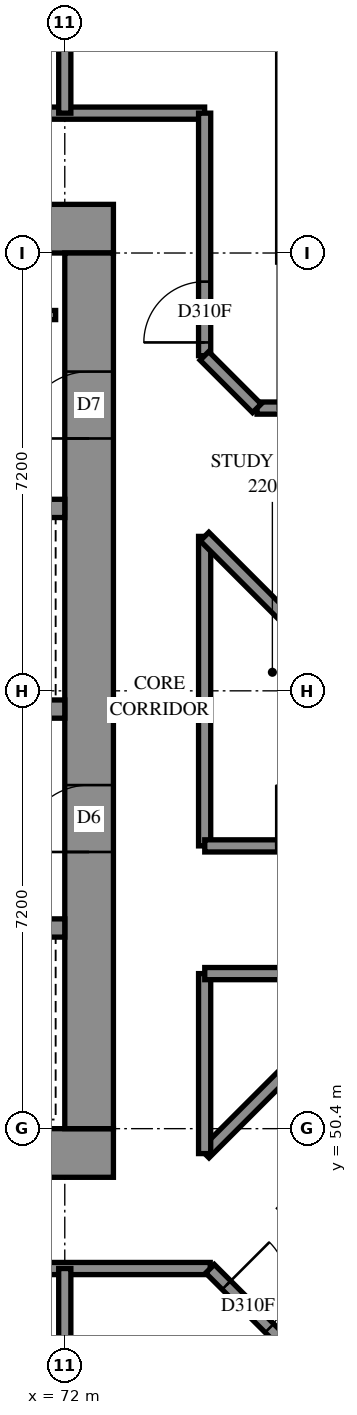
"""IFC4 building model, lengths in metres.
Left out: names, types, materials, properties, quantities, classifications, styles, units other than length and angle.
Written with IfcOpenShell. Run it as: python <this file> out.ifc"""

import sys

from ifc_helpers import new_model, si_unit, direction, frame, frame_2d, origin, place, context, subcontext, project, spatial, rectangle, extrude, element, fill, save


model = new_model("IFC4")
c1 = context("Model", 3, precision=1e-05, world=origin(), true_north=direction((0.0, 1.0)))
c2 = subcontext(c1, "Body", "Model", "MODEL_VIEW")
j1 = project(units=[si_unit("LENGTHUNIT", "METRE"), si_unit("PLANEANGLEUNIT", "RADIAN")], contexts=[c1])
p1 = place(None, origin())
s1 = spatial("IfcSite", under=j1, at=p1, CompositionType="ELEMENT")
p2 = place(p1, origin())
s2 = spatial("IfcBuilding", under=s1, at=p2, CompositionType="ELEMENT")
p3 = place(p2, frame((0.0, 0.0, 84.6)))
s3 = spatial("IfcBuildingStorey", under=s2, at=p3, CompositionType="ELEMENT", Elevation=84.6)
p4 = place(p3, frame((56.8, 50.0, -0.3), z_axis=(0.0, 0.0, 1.0), x_axis=(1.0, 0.0, 0.0)))
e1 = element("IfcWall", 1, at=p4, inside=s3, PredefinedType="SHEAR", context=c2, shape_type="SweptSolid", body=[
    extrude(rectangle(XDim=16.0, YDim=0.8, at=frame_2d((8.0, 0.0))), origin(), (0.0, 0.0, 1.0), 2.7),
])
p5 = place(p3, frame((56.8, 65.2, -0.3), z_axis=(0.0, 0.0, 1.0), x_axis=(1.0, 0.0, 0.0)))
e2 = element("IfcWall", 2, at=p5, inside=s3, PredefinedType="SHEAR", context=c2, shape_type="SweptSolid", body=[
    extrude(rectangle(XDim=16.0, YDim=0.8, at=frame_2d((8.0, 0.0))), origin(), (0.0, 0.0, 1.0), 2.7),
])
p6 = place(p5, frame((10.8, 0.0, 0.3)))
e3 = element("IfcOpeningElement", 3, at=p6, cuts=e2, PredefinedType="OPENING", context=c2, shape_type="SweptSolid", body=[
    extrude(rectangle(XDim=0.8, YDim=2.1, at=frame_2d((0.4, 1.05))), frame((0.0, 0.41, 0.0), z_axis=(0.0, -1.0, 0.0), x_axis=(1.0, 0.0, 0.0)), (0.0, 0.0, 1.0), 0.82),
])
p7 = place(p3, frame((72.4, 50.4, -0.3), z_axis=(0.0, 0.0, 1.0), x_axis=(0.0, 1.0, 0.0)))
e4 = element("IfcWall", 4, at=p7, inside=s3, PredefinedType="SHEAR", context=c2, shape_type="SweptSolid", body=[
    extrude(rectangle(XDim=14.4, YDim=0.8, at=frame_2d((7.2, 0.0))), origin(), (0.0, 0.0, 1.0), 2.7),
])
p8 = place(p7, frame((4.55, 0.0, 0.3)))
e5 = element("IfcOpeningElement", 5, at=p8, cuts=e4, PredefinedType="OPENING", context=c2, shape_type="SweptSolid", body=[
    extrude(rectangle(XDim=1.1, YDim=2.1, at=frame_2d((0.55, 1.05))), frame((0.0, 0.41, 0.0), z_axis=(0.0, -1.0, 0.0), x_axis=(1.0, 0.0, 0.0)), (0.0, 0.0, 1.0), 0.82),
])
p9 = place(p7, frame((11.35, 0.0, 0.3)))
e6 = element("IfcOpeningElement", 6, at=p9, cuts=e4, PredefinedType="OPENING", context=c2, shape_type="SweptSolid", body=[
    extrude(rectangle(XDim=1.1, YDim=2.1, at=frame_2d((0.55, 1.05))), frame((0.0, 0.41, 0.0), z_axis=(0.0, -1.0, 0.0), x_axis=(1.0, 0.0, 0.0)), (0.0, 0.0, 1.0), 0.82),
])
p10 = place(p3, frame((57.6, 53.7, 0.0), z_axis=(0.0, 0.0, 1.0), x_axis=(1.0, 0.0, 0.0)))
e7 = element("IfcWall", 7, at=p10, inside=s3, PredefinedType="SOLIDWALL", context=c2, shape_type="SweptSolid", body=[
    extrude(rectangle(XDim=14.4, YDim=0.3, at=frame_2d((7.2, 0.0))), origin(), (0.0, 0.0, 1.0), 3.1),
])
p11 = place(p10, frame((1.25, 0.0, 0.0)))
e8 = element("IfcOpeningElement", 8, at=p11, cuts=e7, PredefinedType="OPENING", context=c2, shape_type="SweptSolid", body=[
    extrude(rectangle(XDim=1.1, YDim=2.1, at=frame_2d((0.55, 1.05))), frame((0.0, 0.16, 0.0), z_axis=(0.0, -1.0, 0.0), x_axis=(1.0, 0.0, 0.0)), (0.0, 0.0, 1.0), 0.32),
])
p12 = place(p10, frame((4.85, 0.0, 0.0)))
e9 = element("IfcOpeningElement", 9, at=p12, cuts=e7, PredefinedType="OPENING", context=c2, shape_type="SweptSolid", body=[
    extrude(rectangle(XDim=1.1, YDim=2.1, at=frame_2d((0.55, 1.05))), frame((0.0, 0.16, 0.0), z_axis=(0.0, -1.0, 0.0), x_axis=(1.0, 0.0, 0.0)), (0.0, 0.0, 1.0), 0.32),
])
p13 = place(p10, frame((8.45, 0.0, 0.0)))
e10 = element("IfcOpeningElement", 10, at=p13, cuts=e7, PredefinedType="OPENING", context=c2, shape_type="SweptSolid", body=[
    extrude(rectangle(XDim=1.1, YDim=2.1, at=frame_2d((0.55, 1.05))), frame((0.0, 0.16, 0.0), z_axis=(0.0, -1.0, 0.0), x_axis=(1.0, 0.0, 0.0)), (0.0, 0.0, 1.0), 0.32),
])
p14 = place(p10, frame((12.05, 0.0, 0.0)))
e11 = element("IfcOpeningElement", 11, at=p14, cuts=e7, PredefinedType="OPENING", context=c2, shape_type="SweptSolid", body=[
    extrude(rectangle(XDim=1.1, YDim=2.1, at=frame_2d((0.55, 1.05))), frame((0.0, 0.16, 0.0), z_axis=(0.0, -1.0, 0.0), x_axis=(1.0, 0.0, 0.0)), (0.0, 0.0, 1.0), 0.32),
])
p15 = place(p3, frame((57.6, 57.3, 0.0), z_axis=(0.0, 0.0, 1.0), x_axis=(1.0, 0.0, 0.0)))
e12 = element("IfcWall", 12, at=p15, inside=s3, PredefinedType="SOLIDWALL", context=c2, shape_type="SweptSolid", body=[
    extrude(rectangle(XDim=14.4, YDim=0.3, at=frame_2d((7.2, 0.0))), origin(), (0.0, 0.0, 1.0), 3.1),
])
p16 = place(p15, frame((12.05, 0.0, 0.0)))
e13 = element("IfcOpeningElement", 13, at=p16, cuts=e12, PredefinedType="OPENING", context=c2, shape_type="SweptSolid", body=[
    extrude(rectangle(XDim=1.1, YDim=2.1, at=frame_2d((0.55, 1.05))), frame((0.0, 0.16, 0.0), z_axis=(0.0, -1.0, 0.0), x_axis=(1.0, 0.0, 0.0)), (0.0, 0.0, 1.0), 0.32),
])
p17 = place(p3, frame((64.8, 60.6, 0.0), z_axis=(0.0, 0.0, 1.0), x_axis=(1.0, 0.0, 0.0)))
e14 = element("IfcWall", 14, at=p17, inside=s3, PredefinedType="SOLIDWALL", context=c2, shape_type="SweptSolid", body=[
    extrude(rectangle(XDim=7.2, YDim=0.3, at=frame_2d((3.6, 0.0))), origin(), (0.0, 0.0, 1.0), 3.1),
])
p18 = place(p3, frame((64.95, 63.78, 0.0), z_axis=(0.0, 0.0, 1.0), x_axis=(1.0, 0.0, 0.0)))
e15 = element("IfcWall", 15, at=p18, inside=s3, PredefinedType="PARTITIONING", context=c2, shape_type="SweptSolid", body=[
    extrude(rectangle(XDim=6.9, YDim=0.15, at=frame_2d((3.45, 0.0))), origin(), (0.0, 0.0, 1.0), 3.1),
])
p19 = place(p3, frame((55.3, 48.1, 0.0), z_axis=(0.0, 0.0, 1.0), x_axis=(1.0, 0.0, 0.0)))
e16 = element("IfcWall", 16, at=p19, inside=s3, PredefinedType="PARTITIONING", context=c2, shape_type="SweptSolid", body=[
    extrude(rectangle(XDim=19.092, YDim=0.2, at=frame_2d((9.546, 0.0))), origin(), (0.0, 0.0, 1.0), 3.1),
])
p20 = place(p19, frame((6.199, 0.0, 0.0)))
e17 = element("IfcOpeningElement", 17, at=p20, cuts=e16, PredefinedType="OPENING", context=c2, shape_type="SweptSolid", body=[
    extrude(rectangle(XDim=0.9, YDim=2.1, at=frame_2d((0.45, 1.05))), frame((0.0, 0.11, 0.0), z_axis=(0.0, -1.0, 0.0), x_axis=(1.0, 0.0, 0.0)), (0.0, 0.0, 1.0), 0.22),
])
p21 = place(p19, frame((13.363, 0.0, 0.0)))
e18 = element("IfcOpeningElement", 18, at=p21, cuts=e16, PredefinedType="OPENING", context=c2, shape_type="SweptSolid", body=[
    extrude(rectangle(XDim=1.0, YDim=2.1, at=frame_2d((0.5, 1.05))), frame((0.0, 0.11, 0.0), z_axis=(0.0, -1.0, 0.0), x_axis=(1.0, 0.0, 0.0)), (0.0, 0.0, 1.0), 0.22),
])
p22 = place(p3, frame((55.3, 67.1, 0.0), z_axis=(0.0, 0.0, 1.0), x_axis=(1.0, 0.0, 0.0)))
e19 = element("IfcWall", 19, at=p22, inside=s3, PredefinedType="PARTITIONING", context=c2, shape_type="SweptSolid", body=[
    extrude(rectangle(XDim=19.0, YDim=0.2, at=frame_2d((9.5, 0.0))), origin(), (0.0, 0.0, 1.0), 3.1),
])
p23 = place(p22, frame((6.161, 0.0, 0.0)))
e20 = element("IfcOpeningElement", 20, at=p23, cuts=e19, PredefinedType="OPENING", context=c2, shape_type="SweptSolid", body=[
    extrude(rectangle(XDim=0.9, YDim=2.1, at=frame_2d((0.45, 1.05))), frame((0.0, 0.11, 0.0), z_axis=(0.0, -1.0, 0.0), x_axis=(1.0, 0.0, 0.0)), (0.0, 0.0, 1.0), 0.22),
])
p24 = place(p22, frame((13.386, 0.0, 0.0)))
e21 = element("IfcOpeningElement", 21, at=p24, cuts=e19, PredefinedType="OPENING", context=c2, shape_type="SweptSolid", body=[
    extrude(rectangle(XDim=1.0, YDim=2.1, at=frame_2d((0.5, 1.05))), frame((0.0, 0.11, 0.0), z_axis=(0.0, -1.0, 0.0), x_axis=(1.0, 0.0, 0.0)), (0.0, 0.0, 1.0), 0.22),
])
p25 = place(p3, frame((74.3, 55.05, 0.0), z_axis=(0.0, 0.0, 1.0), x_axis=(0.0, 1.0, 0.0)))
e22 = element("IfcWall", 22, at=p25, inside=s3, PredefinedType="PARTITIONING", context=c2, shape_type="SweptSolid", body=[
    extrude(rectangle(XDim=5.09, YDim=0.2, at=frame_2d((2.545, 0.0))), origin(), (0.0, 0.0, 1.0), 3.1),
])
p26 = place(p3, frame((74.302, 55.05, 0.0), z_axis=(0.0, 0.0, 1.0), x_axis=(1.0, 0.0, 0.0)))
e23 = element("IfcWall", 23, at=p26, inside=s3, PredefinedType="PARTITIONING", context=c2, shape_type="SweptSolid", body=[
    extrude(rectangle(XDim=5.088, YDim=0.2, at=frame_2d((2.544, 0.0))), origin(), (0.0, 0.0, 1.0), 3.1),
])
p27 = place(p26, frame((1.176, 0.0, 0.0)))
e24 = element("IfcOpeningElement", 24, at=p27, cuts=e23, PredefinedType="OPENING", context=c2, shape_type="SweptSolid", body=[
    extrude(rectangle(XDim=1.0, YDim=2.1, at=frame_2d((0.5, 1.05))), frame((0.0, 0.11, 0.0), z_axis=(0.0, -1.0, 0.0), x_axis=(1.0, 0.0, 0.0)), (0.0, 0.0, 1.0), 0.22),
])
p28 = place(p3, frame((74.388, 48.096, 0.0), z_axis=(0.0, 0.0, 1.0), x_axis=(0.7071067812, -0.7071067812, 0.0)))
e25 = element("IfcWall", 25, at=p28, inside=s3, PredefinedType="PARTITIONING", context=c2, shape_type="SweptSolid", body=[
    extrude(rectangle(XDim=4.452, YDim=0.2, at=frame_2d((2.226, 0.0))), origin(), (0.0, 0.0, 1.0), 3.1),
])
p29 = place(p28, frame((0.382, 0.0, 0.0)))
e26 = element("IfcOpeningElement", 26, at=p29, cuts=e25, PredefinedType="OPENING", context=c2, shape_type="SweptSolid", body=[
    extrude(rectangle(XDim=1.0, YDim=2.1, at=frame_2d((0.5, 1.05))), frame((0.0, 0.11, 0.0), z_axis=(0.0, -1.0, 0.0), x_axis=(1.0, 0.0, 0.0)), (0.0, 0.0, 1.0), 0.22),
])
p30 = place(p3, frame((74.299, 60.137, 0.0), z_axis=(0.0, 0.0, 1.0), x_axis=(0.7071067812, -0.7071067812, 0.0)))
e27 = element("IfcWall", 27, at=p30, inside=s3, PredefinedType="PARTITIONING", context=c2, shape_type="SweptSolid", body=[
    extrude(rectangle(XDim=4.452, YDim=0.2, at=frame_2d((2.226, 0.0))), origin(), (0.0, 0.0, 1.0), 3.1),
])
for number, where, z_axis, x_axis in (
    (28, (72.0, 67.1, 0.0), (0.0, 0.0, 1.0), (0.0, 1.0, 0.0)),
    (29, (72.0, 43.7, 0.0), (0.0, 0.0, 1.0), (0.0, 1.0, 0.0)),
):
    element("IfcWall", number, at=place(p3, frame(where, z_axis=z_axis, x_axis=x_axis)), inside=s3, PredefinedType="PARTITIONING", context=c2, shape_type="SweptSolid", body=[
        extrude(rectangle(XDim=4.4, YDim=0.2, at=frame_2d((2.2, 0.0))), origin(), (0.0, 0.0, 1.0), 3.1),
    ])
p31 = place(p3, frame((74.301, 49.991, 0.0), z_axis=(0.0, 0.0, 1.0), x_axis=(0.7071067812, 0.7071067812, 0.0)))
e30 = element("IfcWall", 30, at=p31, inside=s3, PredefinedType="PARTITIONING", context=c2, shape_type="SweptSolid", body=[
    extrude(rectangle(XDim=4.183, YDim=0.2, at=frame_2d((2.092, 0.0))), origin(), (0.0, 0.0, 1.0), 3.1),
])
p32 = place(p3, frame((75.162, 62.25, 0.0), z_axis=(0.0, 0.0, 1.0), x_axis=(1.0, 0.0, 0.0)))
e31 = element("IfcWall", 31, at=p32, inside=s3, PredefinedType="PARTITIONING", context=c2, shape_type="SweptSolid", body=[
    extrude(rectangle(XDim=4.038, YDim=0.2, at=frame_2d((2.019, 0.0))), origin(), (0.0, 0.0, 1.0), 3.1),
])
p33 = place(p32, frame((2.788, 0.0, 0.0)))
e32 = element("IfcOpeningElement", 32, at=p33, cuts=e31, PredefinedType="OPENING", context=c2, shape_type="SweptSolid", body=[
    extrude(rectangle(XDim=0.9, YDim=2.1, at=frame_2d((0.45, 1.05))), frame((0.0, 0.11, 0.0), z_axis=(0.0, -1.0, 0.0), x_axis=(1.0, 0.0, 0.0)), (0.0, 0.0, 1.0), 0.22),
])
p34 = place(p3, frame((74.3, 63.112, 0.0), z_axis=(0.0, 0.0, 1.0), x_axis=(0.0, 1.0, 0.0)))
e33 = element("IfcWall", 33, at=p34, inside=s3, PredefinedType="PARTITIONING", context=c2, shape_type="SweptSolid", body=[
    extrude(rectangle(XDim=3.988, YDim=0.2, at=frame_2d((1.994, 0.0))), origin(), (0.0, 0.0, 1.0), 3.1),
])
p35 = place(p34, frame((0.217, 0.0, 0.0)))
e34 = element("IfcOpeningElement", 34, at=p35, cuts=e33, PredefinedType="OPENING", context=c2, shape_type="SweptSolid", body=[
    extrude(rectangle(XDim=1.0, YDim=2.1, at=frame_2d((0.5, 1.05))), frame((0.0, 0.11, 0.0), z_axis=(0.0, -1.0, 0.0), x_axis=(1.0, 0.0, 0.0)), (0.0, 0.0, 1.0), 0.22),
])
p36 = place(p3, frame((74.3, 49.99, 0.0), z_axis=(0.0, 0.0, 1.0), x_axis=(0.0, 1.0, 0.0)))
e35 = element("IfcWall", 35, at=p36, inside=s3, PredefinedType="PARTITIONING", context=c2, shape_type="SweptSolid", body=[
    extrude(rectangle(XDim=2.96, YDim=0.2, at=frame_2d((1.48, 0.0))), origin(), (0.0, 0.0, 1.0), 3.1),
])
p37 = place(p3, frame((74.302, 52.95, 0.0), z_axis=(0.0, 0.0, 1.0), x_axis=(1.0, 0.0, 0.0)))
e36 = element("IfcWall", 36, at=p37, inside=s3, PredefinedType="PARTITIONING", context=c2, shape_type="SweptSolid", body=[
    extrude(rectangle(XDim=2.958, YDim=0.2, at=frame_2d((1.479, 0.0))), origin(), (0.0, 0.0, 1.0), 3.1),
])
p38 = place(p3, frame((74.296, 63.108, 0.0), z_axis=(0.0, 0.0, 1.0), x_axis=(0.7071067812, -0.7071067812, 0.0)))
e37 = element("IfcWall", 37, at=p38, inside=s3, PredefinedType="PARTITIONING", context=c2, shape_type="SweptSolid", body=[
    extrude(rectangle(XDim=1.219, YDim=0.2, at=frame_2d((0.61, 0.0))), origin(), (0.0, 0.0, 1.0), 3.1),
])
p39 = place(p8, origin())
e38 = element("IfcDoor", 38, at=p39, inside=s3, OperationType="DOUBLE_DOOR_SINGLE_SWING", PredefinedType="DOOR", context=c2, shape_type="SweptSolid", body=[
    extrude(rectangle(XDim=1.1, YDim=2.1, at=frame_2d((0.55, 1.05))), frame((0.0, 0.025, 0.0), z_axis=(0.0, -1.0, 0.0), x_axis=(1.0, 0.0, 0.0)), (0.0, 0.0, 1.0), 0.05),
])
fill(e5, e38)
p40 = place(p9, origin())
e39 = element("IfcDoor", 39, at=p40, inside=s3, OperationType="SINGLE_SWING_RIGHT", PredefinedType="DOOR", context=c2, shape_type="SweptSolid", body=[
    extrude(rectangle(XDim=1.1, YDim=2.1, at=frame_2d((0.55, 1.05))), frame((0.0, 0.025, 0.0), z_axis=(0.0, -1.0, 0.0), x_axis=(1.0, 0.0, 0.0)), (0.0, 0.0, 1.0), 0.05),
])
fill(e6, e39)
p41 = place(p35, origin())
e40 = element("IfcDoor", 40, at=p41, inside=s3, OperationType="SINGLE_SWING_RIGHT", PredefinedType="DOOR", context=c2, shape_type="SweptSolid", body=[
    extrude(rectangle(XDim=1.0, YDim=2.1, at=frame_2d((0.5, 1.05))), frame((0.0, 0.025, 0.0), z_axis=(0.0, -1.0, 0.0), x_axis=(1.0, 0.0, 0.0)), (0.0, 0.0, 1.0), 0.05),
])
fill(e34, e40)
p42 = place(p27, origin())
e41 = element("IfcDoor", 41, at=p42, inside=s3, OperationType="SINGLE_SWING_LEFT", PredefinedType="DOOR", context=c2, shape_type="SweptSolid", body=[
    extrude(rectangle(XDim=1.0, YDim=2.1, at=frame_2d((0.5, 1.05))), frame((0.0, 0.025, 0.0), z_axis=(0.0, -1.0, 0.0), x_axis=(1.0, 0.0, 0.0)), (0.0, 0.0, 1.0), 0.05),
])
fill(e24, e41)
p43 = place(p29, origin())
e42 = element("IfcDoor", 42, at=p43, inside=s3, OperationType="SINGLE_SWING_LEFT", PredefinedType="DOOR", context=c2, shape_type="SweptSolid", body=[
    extrude(rectangle(XDim=1.0, YDim=2.1, at=frame_2d((0.5, 1.05))), frame((0.0, 0.025, 0.0), z_axis=(0.0, -1.0, 0.0), x_axis=(1.0, 0.0, 0.0)), (0.0, 0.0, 1.0), 0.05),
])
fill(e26, e42)
save(model, sys.argv[1])
